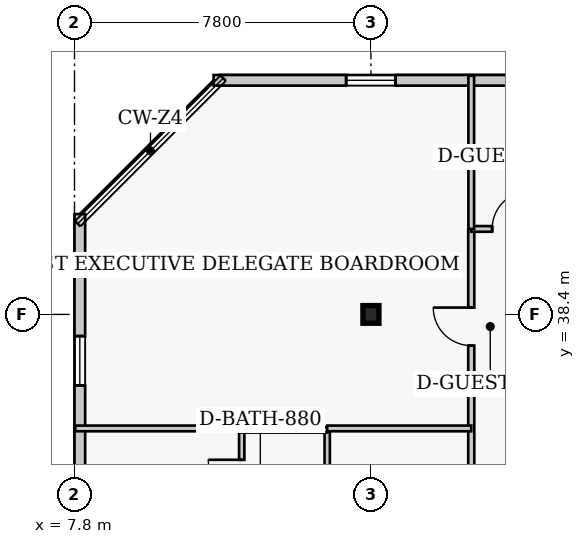
"""IFC4 building model, lengths in metres.
Left out: names, types, materials, properties, quantities, classifications, styles, units other than length and angle.
Written with IfcOpenShell. Run it as: python <this file> out.ifc"""

import sys

from ifc_helpers import new_model, si_unit, direction, frame, frame_2d, origin, origin_2d, place, context, subcontext, project, spatial, rectangle, i_section, extrude, element, fill, save


model = new_model("IFC4")
c1 = context("Model", 3, precision=1e-05, world=origin(), true_north=direction((0.0, 1.0)))
c2 = subcontext(c1, "Body", "Model", "MODEL_VIEW")
j1 = project(units=[si_unit("LENGTHUNIT", "METRE"), si_unit("PLANEANGLEUNIT", "RADIAN")], contexts=[c1])
p1 = place(None, origin())
s1 = spatial("IfcSite", under=j1, at=p1, CompositionType="ELEMENT")
p2 = place(p1, origin())
s2 = spatial("IfcBuilding", under=s1, at=p2, CompositionType="ELEMENT")
p3 = place(p2, frame((0.0, 0.0, 257.4)))
s3 = spatial("IfcBuildingStorey", under=s2, at=p3, CompositionType="ELEMENT", Elevation=257.4)
p4 = place(p3, frame((15.6, 38.4, 0.0), z_axis=(0.0, 0.0, 1.0), x_axis=(1.0, 0.0, 0.0)))
e1 = element("IfcColumn", 1, at=p4, inside=s3, PredefinedType="COLUMN", context=c2, shape_type="SweptSolid", body=[
    extrude(i_section(OverallWidth=0.422, OverallDepth=0.465, WebThickness=0.045, FlangeThickness=0.073, FilletRadius=0.017, at=origin_2d()), origin(), (0.0, 0.0, 1.0), 4.0),
])
p5 = place(p3, frame((36.29, 44.56, 0.0), z_axis=(0.0, 0.0, 1.0), x_axis=(-1.0, 0.0, 0.0)))
e2 = element("IfcWall", 2, at=p5, inside=s3, PredefinedType="SOLIDWALL", context=c2, shape_type="SweptSolid", body=[
    extrude(rectangle(XDim=24.83, YDim=0.28, at=frame_2d((12.415, 0.0))), origin(), (0.0, 0.0, 1.0), 3.76),
])
p6 = place(p5, frame((3.488, 0.0, 0.85)))
e3 = element("IfcOpeningElement", 3, at=p6, cuts=e2, PredefinedType="OPENING", context=c2, shape_type="SweptSolid", body=[
    extrude(rectangle(XDim=1.3, YDim=1.7, at=frame_2d((0.65, 0.85))), frame((0.0, 0.15, 0.0), z_axis=(0.0, -1.0, 0.0), x_axis=(1.0, 0.0, 0.0)), (0.0, 0.0, 1.0), 0.3),
])
p7 = place(p5, frame((11.765, 0.0, 0.85)))
e4 = element("IfcOpeningElement", 4, at=p7, cuts=e2, PredefinedType="OPENING", context=c2, shape_type="SweptSolid", body=[
    extrude(rectangle(XDim=1.3, YDim=1.7, at=frame_2d((0.65, 0.85))), frame((0.0, 0.15, 0.0), z_axis=(0.0, -1.0, 0.0), x_axis=(1.0, 0.0, 0.0)), (0.0, 0.0, 1.0), 0.3),
])
p8 = place(p5, frame((20.042, 0.0, 0.85)))
e5 = element("IfcOpeningElement", 5, at=p8, cuts=e2, PredefinedType="OPENING", context=c2, shape_type="SweptSolid", body=[
    extrude(rectangle(XDim=1.3, YDim=1.7, at=frame_2d((0.65, 0.85))), frame((0.0, 0.15, 0.0), z_axis=(0.0, -1.0, 0.0), x_axis=(1.0, 0.0, 0.0)), (0.0, 0.0, 1.0), 0.3),
])
p9 = place(p3, frame((7.94, 41.04, 0.0), z_axis=(0.0, 0.0, 1.0), x_axis=(0.0, -1.0, 0.0)))
e6 = element("IfcWall", 6, at=p9, inside=s3, PredefinedType="SOLIDWALL", context=c2, shape_type="SweptSolid", body=[
    extrude(rectangle(XDim=30.88, YDim=0.28, at=frame_2d((15.44, 0.0))), origin(), (0.0, 0.0, 1.0), 3.76),
])
p10 = place(p9, frame((3.21, 0.0, 0.85)))
e7 = element("IfcOpeningElement", 7, at=p10, cuts=e6, PredefinedType="OPENING", context=c2, shape_type="SweptSolid", body=[
    extrude(rectangle(XDim=1.3, YDim=1.7, at=frame_2d((0.65, 0.85))), frame((0.0, 0.15, 0.0), z_axis=(0.0, -1.0, 0.0), x_axis=(1.0, 0.0, 0.0)), (0.0, 0.0, 1.0), 0.3),
])
p11 = place(p9, frame((10.28, 0.0, 0.85)))
e8 = element("IfcOpeningElement", 8, at=p11, cuts=e6, PredefinedType="OPENING", context=c2, shape_type="SweptSolid", body=[
    extrude(rectangle(XDim=1.3, YDim=1.7, at=frame_2d((0.65, 0.85))), frame((0.0, 0.15, 0.0), z_axis=(0.0, -1.0, 0.0), x_axis=(1.0, 0.0, 0.0)), (0.0, 0.0, 1.0), 0.3),
])
p12 = place(p9, frame((18.65, 0.0, 0.85)))
e9 = element("IfcOpeningElement", 9, at=p12, cuts=e6, PredefinedType="OPENING", context=c2, shape_type="SweptSolid", body=[
    extrude(rectangle(XDim=1.3, YDim=1.7, at=frame_2d((0.65, 0.85))), frame((0.0, 0.15, 0.0), z_axis=(0.0, -1.0, 0.0), x_axis=(1.0, 0.0, 0.0)), (0.0, 0.0, 1.0), 0.3),
])
p13 = place(p9, frame((26.37, 0.0, 0.85)))
e10 = element("IfcOpeningElement", 10, at=p13, cuts=e6, PredefinedType="OPENING", context=c2, shape_type="SweptSolid", body=[
    extrude(rectangle(XDim=1.3, YDim=1.7, at=frame_2d((0.65, 0.85))), frame((0.0, 0.15, 0.0), z_axis=(0.0, -1.0, 0.0), x_axis=(1.0, 0.0, 0.0)), (0.0, 0.0, 1.0), 0.3),
])
p14 = place(p3, frame((18.24, 8.55, 0.0), z_axis=(0.0, 0.0, 1.0), x_axis=(0.0, 1.0, 0.0)))
e11 = element("IfcWall", 11, at=p14, inside=s3, PredefinedType="PARTITIONING", context=c2, shape_type="SweptSolid", body=[
    extrude(rectangle(XDim=32.1, YDim=0.16, at=frame_2d((16.05, 0.0))), origin(), (0.0, 0.0, 1.0), 3.76),
])
p15 = place(p14, frame((5.25, 0.0, 0.0)))
e12 = element("IfcOpeningElement", 12, at=p15, cuts=e11, PredefinedType="OPENING", context=c2, shape_type="SweptSolid", body=[
    extrude(rectangle(XDim=0.95, YDim=2.1, at=frame_2d((0.475, 1.05))), frame((0.0, 0.09, 0.0), z_axis=(0.0, -1.0, 0.0), x_axis=(1.0, 0.0, 0.0)), (0.0, 0.0, 1.0), 0.18),
])
p16 = place(p14, frame((15.375, 0.0, 0.0)))
e13 = element("IfcOpeningElement", 13, at=p16, cuts=e11, PredefinedType="OPENING", context=c2, shape_type="SweptSolid", body=[
    extrude(rectangle(XDim=0.95, YDim=2.1, at=frame_2d((0.475, 1.05))), frame((0.0, 0.09, 0.0), z_axis=(0.0, -1.0, 0.0), x_axis=(1.0, 0.0, 0.0)), (0.0, 0.0, 1.0), 0.18),
])
p17 = place(p14, frame((23.075, 0.0, 0.0)))
e14 = element("IfcOpeningElement", 14, at=p17, cuts=e11, PredefinedType="OPENING", context=c2, shape_type="SweptSolid", body=[
    extrude(rectangle(XDim=0.95, YDim=2.1, at=frame_2d((0.475, 1.05))), frame((0.0, 0.09, 0.0), z_axis=(0.0, -1.0, 0.0), x_axis=(1.0, 0.0, 0.0)), (0.0, 0.0, 1.0), 0.18),
])
p18 = place(p14, frame((29.03, 0.0, 0.0)))
e15 = element("IfcOpeningElement", 15, at=p18, cuts=e11, PredefinedType="OPENING", context=c2, shape_type="SweptSolid", body=[
    extrude(rectangle(XDim=1.0, YDim=2.15, at=frame_2d((0.5, 1.075))), frame((0.0, 0.09, 0.0), z_axis=(0.0, -1.0, 0.0), x_axis=(1.0, 0.0, 0.0)), (0.0, 0.0, 1.0), 0.18),
])
p19 = place(p3, frame((18.24, 40.65, 0.0), z_axis=(0.0, 0.0, 1.0), x_axis=(1.0, 0.0, 0.0)))
e16 = element("IfcWall", 16, at=p19, inside=s3, PredefinedType="PARTITIONING", context=c2, shape_type="SweptSolid", body=[
    extrude(rectangle(XDim=3.86, YDim=0.15, at=frame_2d((1.93, 0.0))), origin(), (0.0, 0.0, 1.0), 3.76),
])
p20 = place(p19, frame((0.55, 0.0, 0.0)))
e17 = element("IfcOpeningElement", 17, at=p20, cuts=e16, PredefinedType="OPENING", context=c2, shape_type="SweptSolid", body=[
    extrude(rectangle(XDim=1.0, YDim=2.15, at=frame_2d((0.5, 1.075))), frame((0.0, 0.085, 0.0), z_axis=(0.0, -1.0, 0.0), x_axis=(1.0, 0.0, 0.0)), (0.0, 0.0, 1.0), 0.17),
])
p21 = place(p3, frame((18.24, 40.65, 0.0), z_axis=(0.0, 0.0, 1.0), x_axis=(0.0, 1.0, 0.0)))
e18 = element("IfcWall", 18, at=p21, inside=s3, PredefinedType="PARTITIONING", context=c2, shape_type="SweptSolid", body=[
    extrude(rectangle(XDim=4.03, YDim=0.15, at=frame_2d((2.015, 0.0))), origin(), (0.0, 0.0, 1.0), 3.76),
])
p22 = place(p3, frame((12.2, 32.91, 0.0), z_axis=(0.0, 0.0, 1.0), x_axis=(0.0, 1.0, 0.0)))
e19 = element("IfcWall", 19, at=p22, inside=s3, PredefinedType="PLUMBINGWALL", context=c2, shape_type="SweptSolid", body=[
    extrude(rectangle(XDim=2.45, YDim=0.14, at=frame_2d((1.225, 0.0))), origin(), (0.0, 0.0, 1.0), 3.76),
])
p23 = place(p22, frame((0.785, 0.0, 0.0)))
e20 = element("IfcOpeningElement", 20, at=p23, cuts=e19, PredefinedType="OPENING", context=c2, shape_type="SweptSolid", body=[
    extrude(rectangle(XDim=0.88, YDim=2.05, at=frame_2d((0.44, 1.025))), frame((0.0, 0.08, 0.0), z_axis=(0.0, -1.0, 0.0), x_axis=(1.0, 0.0, 0.0)), (0.0, 0.0, 1.0), 0.16),
])
p24 = place(p3, frame((14.45, 32.91, 0.0), z_axis=(0.0, 0.0, 1.0), x_axis=(0.0, 1.0, 0.0)))
e21 = element("IfcWall", 21, at=p24, inside=s3, PredefinedType="PLUMBINGWALL", context=c2, shape_type="SweptSolid", body=[
    extrude(rectangle(XDim=2.45, YDim=0.14, at=frame_2d((1.225, 0.0))), origin(), (0.0, 0.0, 1.0), 3.76),
])
p25 = place(p3, frame((12.2, 35.36, 0.0), z_axis=(0.0, 0.0, 1.0), x_axis=(1.0, 0.0, 0.0)))
e22 = element("IfcWall", 22, at=p25, inside=s3, PredefinedType="PLUMBINGWALL", context=c2, shape_type="SweptSolid", body=[
    extrude(rectangle(XDim=2.25, YDim=0.14, at=frame_2d((1.125, 0.0))), origin(), (0.0, 0.0, 1.0), 3.76),
])
p26 = place(p3, frame((7.82, 35.4, 0.0), z_axis=(0.0, 0.0, 1.0), x_axis=(1.0, 0.0, 0.0)))
e23 = element("IfcWall", 23, at=p26, inside=s3, PredefinedType="PARTITIONING", context=c2, shape_type="SweptSolid", body=[
    extrude(rectangle(XDim=4.38, YDim=0.15, at=frame_2d((2.19, 0.0))), origin(), (0.0, 0.0, 1.0), 3.76),
])
p27 = place(p3, frame((14.45, 35.4, 0.0), z_axis=(0.0, 0.0, 1.0), x_axis=(1.0, 0.0, 0.0)))
e24 = element("IfcWall", 24, at=p27, inside=s3, PredefinedType="PARTITIONING", context=c2, shape_type="SweptSolid", body=[
    extrude(rectangle(XDim=3.79, YDim=0.15, at=frame_2d((1.895, 0.0))), origin(), (0.0, 0.0, 1.0), 3.76),
])
p28 = place(p8, origin())
e25 = element("IfcWindow", 25, at=p28, inside=s3, PartitioningType="SINGLE_PANEL", PredefinedType="WINDOW", context=c2, shape_type="SweptSolid", body=[
    extrude(rectangle(XDim=1.3, YDim=1.7, at=frame_2d((0.65, 0.85))), frame((0.0, 0.03, 0.0), z_axis=(0.0, -1.0, 0.0), x_axis=(1.0, 0.0, 0.0)), (0.0, 0.0, 1.0), 0.06),
])
fill(e5, e25)
p29 = place(p10, origin())
e26 = element("IfcWindow", 26, at=p29, inside=s3, PartitioningType="SINGLE_PANEL", PredefinedType="WINDOW", context=c2, shape_type="SweptSolid", body=[
    extrude(rectangle(XDim=1.3, YDim=1.7, at=frame_2d((0.65, 0.85))), frame((0.0, 0.03, 0.0), z_axis=(0.0, -1.0, 0.0), x_axis=(1.0, 0.0, 0.0)), (0.0, 0.0, 1.0), 0.06),
])
fill(e7, e26)
p30 = place(p20, origin())
e27 = element("IfcDoor", 27, at=p30, inside=s3, OperationType="SINGLE_SWING_RIGHT", PredefinedType="DOOR", context=c2, shape_type="SweptSolid", body=[
    extrude(rectangle(XDim=1.0, YDim=2.15, at=frame_2d((0.5, 1.075))), frame((0.0, 0.025, 0.0), z_axis=(0.0, -1.0, 0.0), x_axis=(1.0, 0.0, 0.0)), (0.0, 0.0, 1.0), 0.05),
])
fill(e17, e27)
p31 = place(p23, origin())
e28 = element("IfcDoor", 28, at=p31, inside=s3, OperationType="SINGLE_SWING_RIGHT", PredefinedType="DOOR", context=c2, shape_type="SweptSolid", body=[
    extrude(rectangle(XDim=0.88, YDim=2.05, at=frame_2d((0.44, 1.025))), frame((0.0, 0.025, 0.0), z_axis=(0.0, -1.0, 0.0), x_axis=(1.0, 0.0, 0.0)), (0.0, 0.0, 1.0), 0.05),
])
fill(e20, e28)
p32 = place(p18, origin())
e29 = element("IfcDoor", 29, at=p32, inside=s3, OperationType="SINGLE_SWING_RIGHT", PredefinedType="DOOR", context=c2, shape_type="SweptSolid", body=[
    extrude(rectangle(XDim=1.0, YDim=2.15, at=frame_2d((0.5, 1.075))), frame((0.0, 0.025, 0.0), z_axis=(0.0, -1.0, 0.0), x_axis=(1.0, 0.0, 0.0)), (0.0, 0.0, 1.0), 0.05),
])
fill(e15, e29)
save(model, sys.argv[1])
